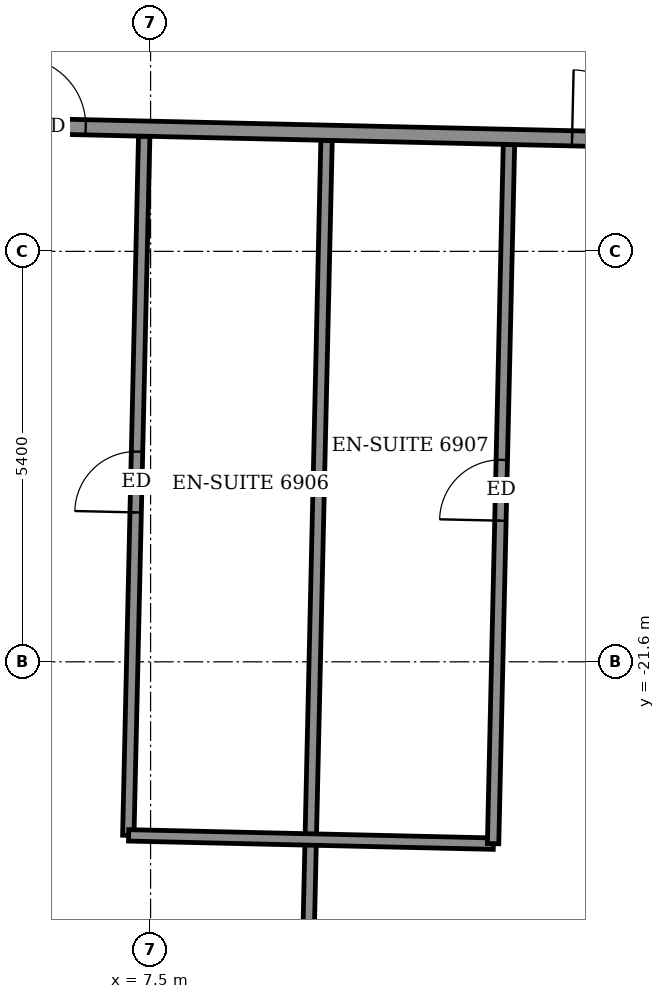
"""IFC4 building model, lengths in metres.
Left out: names, types, materials, properties, quantities, classifications, styles, units other than length and angle.
Written with IfcOpenShell. Run it as: python <this file> out.ifc"""

import sys

from ifc_helpers import new_model, si_unit, direction, frame, frame_2d, origin, place, context, subcontext, project, spatial, rectangle, extrude, element, fill, save


model = new_model("IFC4")
c1 = context("Model", 3, precision=1e-05, world=origin(), true_north=direction((0.0, 1.0)))
c2 = subcontext(c1, "Body", "Model", "MODEL_VIEW")
j1 = project(units=[si_unit("LENGTHUNIT", "METRE"), si_unit("PLANEANGLEUNIT", "RADIAN")], contexts=[c1])
p1 = place(None, origin())
s1 = spatial("IfcSite", under=j1, at=p1, CompositionType="ELEMENT")
p2 = place(p1, origin())
s2 = spatial("IfcBuilding", under=s1, at=p2, CompositionType="ELEMENT")
p3 = place(p2, frame((0.0, 0.0, 271.7)))
s3 = spatial("IfcBuildingStorey", under=s2, at=p3, CompositionType="ELEMENT", Elevation=271.7)
p4 = place(p3, frame((9.541, -26.837, 0.0), z_axis=(0.0, 0.0, 1.0), x_axis=(0.02263844782, 0.9997437175, 0.0)))
e1 = element("IfcWall", 1, at=p4, inside=s3, PredefinedType="PARTITIONING", context=c2, shape_type="SweptSolid", body=[
    extrude(rectangle(XDim=12.1, YDim=0.15, at=frame_2d((6.05, 0.0))), origin(), (0.0, 0.0, 1.0), 2.55),
])
p5 = place(p3, frame((7.207, -23.883, 0.0), z_axis=(0.0, 0.0, 1.0), x_axis=(0.02271477479, 0.999741986218, 0.0)))
e2 = element("IfcWall", 2, at=p5, inside=s3, PredefinedType="PARTITIONING", context=c2, shape_type="SweptSolid", body=[
    extrude(rectangle(XDim=9.2, YDim=0.15, at=frame_2d((4.6, 0.0))), origin(), (0.0, 0.0, 1.0), 3.05),
])
p6 = place(p5, frame((4.25, 0.0, 0.0)))
e3 = element("IfcOpeningElement", 3, at=p6, cuts=e2, PredefinedType="OPENING", context=c2, shape_type="SweptSolid", body=[
    extrude(rectangle(XDim=0.8, YDim=2.1, at=frame_2d((0.4, 1.05))), frame((0.0, 0.085, 0.0), z_axis=(0.0, -1.0, 0.0), x_axis=(1.0, 0.0, 0.0)), (0.0, 0.0, 1.0), 0.17),
])
p7 = place(p3, frame((7.211, -23.883, 0.0), z_axis=(0.0, 0.0, 1.0), x_axis=(0.999742701292, -0.022683280499, 0.0)))
e4 = element("IfcWall", 4, at=p7, inside=s3, PredefinedType="PARTITIONING", context=c2, shape_type="SweptSolid", body=[
    extrude(rectangle(XDim=4.8, YDim=0.15, at=frame_2d((2.4, 0.0))), origin(), (0.0, 0.0, 1.0), 3.05),
])
p8 = place(p3, frame((12.006, -23.992, 0.0), z_axis=(0.0, 0.0, 1.0), x_axis=(0.02271477479, 0.999741986218, 0.0)))
e5 = element("IfcWall", 5, at=p8, inside=s3, PredefinedType="PARTITIONING", context=c2, shape_type="SweptSolid", body=[
    extrude(rectangle(XDim=9.2, YDim=0.15, at=frame_2d((4.6, 0.0))), origin(), (0.0, 0.0, 1.0), 3.05),
])
p9 = place(p8, frame((4.25, 0.0, 0.0)))
e6 = element("IfcOpeningElement", 6, at=p9, cuts=e5, PredefinedType="OPENING", context=c2, shape_type="SweptSolid", body=[
    extrude(rectangle(XDim=0.8, YDim=2.1, at=frame_2d((0.4, 1.05))), frame((0.0, 0.085, 0.0), z_axis=(0.0, -1.0, 0.0), x_axis=(1.0, 0.0, 0.0)), (0.0, 0.0, 1.0), 0.17),
])
p10 = place(p3, frame((-25.12, -13.847, 0.0), z_axis=(0.0, 0.0, 1.0), x_axis=(0.999742852445, -0.022676617578, 0.0)))
e7 = element("IfcWall", 7, at=p10, inside=s3, PredefinedType="PARTITIONING", context=c2, shape_type="SweptSolid", body=[
    extrude(rectangle(XDim=52.873, YDim=0.2, at=frame_2d((26.437, 0.0))), origin(), (0.0, 0.0, 1.0), 3.05),
])
p11 = place(p10, frame((2.43, 0.0, 0.0)))
e8 = element("IfcOpeningElement", 8, at=p11, cuts=e7, PredefinedType="OPENING", context=c2, shape_type="SweptSolid", body=[
    extrude(rectangle(XDim=1.0, YDim=2.1, at=frame_2d((0.5, 1.05))), frame((0.0, 0.11, 0.0), z_axis=(0.0, -1.0, 0.0), x_axis=(1.0, 0.0, 0.0)), (0.0, 0.0, 1.0), 0.22),
])
p12 = place(p10, frame((10.325, 0.0, 0.0)))
e9 = element("IfcOpeningElement", 9, at=p12, cuts=e7, PredefinedType="OPENING", context=c2, shape_type="SweptSolid", body=[
    extrude(rectangle(XDim=0.9, YDim=2.1, at=frame_2d((0.45, 1.05))), frame((0.0, 0.11, 0.0), z_axis=(0.0, -1.0, 0.0), x_axis=(1.0, 0.0, 0.0)), (0.0, 0.0, 1.0), 0.22),
])
p13 = place(p10, frame((12.575, 0.0, 0.0)))
e10 = element("IfcOpeningElement", 10, at=p13, cuts=e7, PredefinedType="OPENING", context=c2, shape_type="SweptSolid", body=[
    extrude(rectangle(XDim=0.9, YDim=2.1, at=frame_2d((0.45, 1.05))), frame((0.0, 0.11, 0.0), z_axis=(0.0, -1.0, 0.0), x_axis=(1.0, 0.0, 0.0)), (0.0, 0.0, 1.0), 0.22),
])
p14 = place(p10, frame((19.45, 0.0, 0.0)))
e11 = element("IfcOpeningElement", 11, at=p14, cuts=e7, PredefinedType="OPENING", context=c2, shape_type="SweptSolid", body=[
    extrude(rectangle(XDim=0.9, YDim=2.1, at=frame_2d((0.45, 1.05))), frame((0.0, 0.11, 0.0), z_axis=(0.0, -1.0, 0.0), x_axis=(1.0, 0.0, 0.0)), (0.0, 0.0, 1.0), 0.22),
])
p15 = place(p10, frame((21.625, 0.0, 0.0)))
e12 = element("IfcOpeningElement", 12, at=p15, cuts=e7, PredefinedType="OPENING", context=c2, shape_type="SweptSolid", body=[
    extrude(rectangle(XDim=0.9, YDim=2.1, at=frame_2d((0.45, 1.05))), frame((0.0, 0.11, 0.0), z_axis=(0.0, -1.0, 0.0), x_axis=(1.0, 0.0, 0.0)), (0.0, 0.0, 1.0), 0.22),
])
p16 = place(p10, frame((28.575, 0.0, 0.0)))
e13 = element("IfcOpeningElement", 13, at=p16, cuts=e7, PredefinedType="OPENING", context=c2, shape_type="SweptSolid", body=[
    extrude(rectangle(XDim=0.9, YDim=2.1, at=frame_2d((0.45, 1.05))), frame((0.0, 0.11, 0.0), z_axis=(0.0, -1.0, 0.0), x_axis=(1.0, 0.0, 0.0)), (0.0, 0.0, 1.0), 0.22),
])
p17 = place(p10, frame((30.875, 0.0, 0.0)))
e14 = element("IfcOpeningElement", 14, at=p17, cuts=e7, PredefinedType="OPENING", context=c2, shape_type="SweptSolid", body=[
    extrude(rectangle(XDim=0.9, YDim=2.1, at=frame_2d((0.45, 1.05))), frame((0.0, 0.11, 0.0), z_axis=(0.0, -1.0, 0.0), x_axis=(1.0, 0.0, 0.0)), (0.0, 0.0, 1.0), 0.22),
])
p18 = place(p10, frame((38.175, 0.0, 0.0)))
e15 = element("IfcOpeningElement", 15, at=p18, cuts=e7, PredefinedType="OPENING", context=c2, shape_type="SweptSolid", body=[
    extrude(rectangle(XDim=0.9, YDim=2.1, at=frame_2d((0.45, 1.05))), frame((0.0, 0.11, 0.0), z_axis=(0.0, -1.0, 0.0), x_axis=(1.0, 0.0, 0.0)), (0.0, 0.0, 1.0), 0.22),
])
p19 = place(p10, frame((40.675, 0.0, 0.0)))
e16 = element("IfcOpeningElement", 16, at=p19, cuts=e7, PredefinedType="OPENING", context=c2, shape_type="SweptSolid", body=[
    extrude(rectangle(XDim=0.9, YDim=2.1, at=frame_2d((0.45, 1.05))), frame((0.0, 0.11, 0.0), z_axis=(0.0, -1.0, 0.0), x_axis=(1.0, 0.0, 0.0)), (0.0, 0.0, 1.0), 0.22),
])
p20 = place(p10, frame((50.561, 0.0, 0.0)))
e17 = element("IfcOpeningElement", 17, at=p20, cuts=e7, PredefinedType="OPENING", context=c2, shape_type="SweptSolid", body=[
    extrude(rectangle(XDim=1.0, YDim=2.1, at=frame_2d((0.5, 1.05))), frame((0.0, 0.11, 0.0), z_axis=(0.0, -1.0, 0.0), x_axis=(1.0, 0.0, 0.0)), (0.0, 0.0, 1.0), 0.22),
])
p21 = place(p10, frame((45.6, 0.0, 0.0)))
e18 = element("IfcOpeningElement", 18, at=p21, cuts=e7, PredefinedType="OPENING", context=c2, shape_type="SweptSolid", body=[
    extrude(rectangle(XDim=0.9, YDim=2.1, at=frame_2d((0.45, 1.05))), frame((0.0, 0.11, 0.0), z_axis=(0.0, -1.0, 0.0), x_axis=(1.0, 0.0, 0.0)), (0.0, 0.0, 1.0), 0.22),
])
p22 = place(p17, origin())
e19 = element("IfcDoor", 19, at=p22, inside=s3, OperationType="SINGLE_SWING_RIGHT", PredefinedType="DOOR", context=c2, shape_type="SweptSolid", body=[
    extrude(rectangle(XDim=0.9, YDim=2.1, at=frame_2d((0.45, 1.05))), frame((0.0, 0.025, 0.0), z_axis=(0.0, -1.0, 0.0), x_axis=(1.0, 0.0, 0.0)), (0.0, 0.0, 1.0), 0.05),
])
fill(e14, e19)
p23 = place(p6, origin())
e20 = element("IfcDoor", 20, at=p23, inside=s3, OperationType="SINGLE_SWING_RIGHT", PredefinedType="DOOR", context=c2, shape_type="SweptSolid", body=[
    extrude(rectangle(XDim=0.8, YDim=2.1, at=frame_2d((0.4, 1.05))), frame((0.0, 0.025, 0.0), z_axis=(0.0, -1.0, 0.0), x_axis=(1.0, 0.0, 0.0)), (0.0, 0.0, 1.0), 0.05),
])
fill(e3, e20)
p24 = place(p18, origin())
e21 = element("IfcDoor", 21, at=p24, inside=s3, OperationType="SINGLE_SWING_LEFT", PredefinedType="DOOR", context=c2, shape_type="SweptSolid", body=[
    extrude(rectangle(XDim=0.9, YDim=2.1, at=frame_2d((0.45, 1.05))), frame((0.0, 0.025, 0.0), z_axis=(0.0, -1.0, 0.0), x_axis=(1.0, 0.0, 0.0)), (0.0, 0.0, 1.0), 0.05),
])
fill(e15, e21)
p25 = place(p9, origin())
e22 = element("IfcDoor", 22, at=p25, inside=s3, OperationType="SINGLE_SWING_LEFT", PredefinedType="DOOR", context=c2, shape_type="SweptSolid", body=[
    extrude(rectangle(XDim=0.8, YDim=2.1, at=frame_2d((0.4, 1.05))), frame((0.0, 0.025, 0.0), z_axis=(0.0, -1.0, 0.0), x_axis=(1.0, 0.0, 0.0)), (0.0, 0.0, 1.0), 0.05),
])
fill(e6, e22)
save(model, sys.argv[1])
